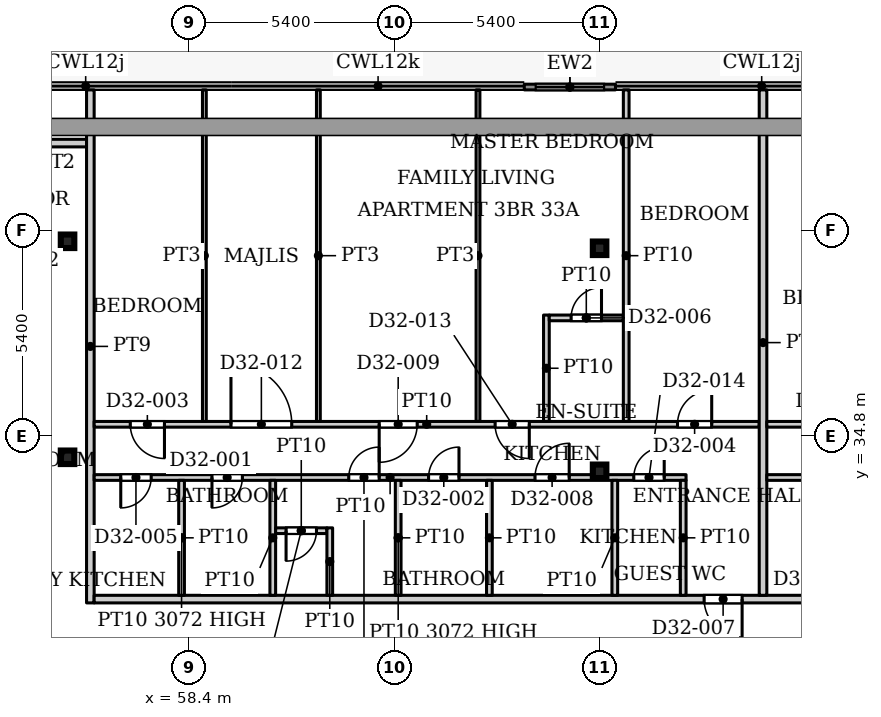
"""IFC4 building model, lengths in metres.
Left out: names, types, materials, properties, quantities, classifications, styles, units other than length and angle.
Written with IfcOpenShell. Run it as: python <this file> out.ifc"""

import sys

from ifc_helpers import new_model, si_unit, direction, frame, frame_2d, origin, origin_2d, place, context, subcontext, project, spatial, rectangle, hollow_rectangle, extrude, source, transform, mapped, element, fill, save


model = new_model("IFC4")
c1 = context("Model", 3, precision=1e-05, world=origin(), true_north=direction((0.0, 1.0)))
c2 = subcontext(c1, "Body", "Model", "MODEL_VIEW")
j1 = project(units=[si_unit("LENGTHUNIT", "METRE"), si_unit("PLANEANGLEUNIT", "RADIAN")], contexts=[c1])
p1 = place(None, origin())
s1 = spatial("IfcSite", under=j1, at=p1, CompositionType="ELEMENT")
p2 = place(p1, origin())
s2 = spatial("IfcBuilding", under=s1, at=p2, CompositionType="ELEMENT")
p3 = place(p2, frame((0.0, 0.0, 140.9)))
s3 = spatial("IfcBuildingStorey", under=s2, at=p3, CompositionType="ELEMENT", Elevation=140.9)
for number, where, z_axis, x_axis in (
    (1, (69.2, 33.863, 0.0), (0.0, 0.0, 1.0), (1.0, 0.0, 0.0)),
    (2, (55.2, 34.232, 0.0), (0.0, 0.0, 1.0), (1.0, 0.0, 0.0)),
    (3, (69.2, 39.732, 0.0), (0.0, 0.0, 1.0), (1.0, 0.0, 0.0)),
    (4, (55.2, 39.916, 0.0), (0.0, 0.0, 1.0), (1.0, 0.0, 0.0)),
):
    element("IfcColumn", number, at=place(p3, frame(where, z_axis=z_axis, x_axis=x_axis)), inside=s3, PredefinedType="COLUMN", context=c2, shape_type="SweptSolid", body=[
        extrude(hollow_rectangle(XDim=0.356, YDim=0.356, WallThickness=0.016, InnerFilletRadius=0.016, OuterFilletRadius=0.032, at=origin_2d()), origin(), (0.0, 0.0, 1.0), 3.9),
    ])
p4 = place(p3, frame((67.218, 43.975, 0.0), z_axis=(0.0, 0.0, 1.0), x_axis=(1.0, 0.0, 0.0)))
e5 = element("IfcWall", 5, at=p4, inside=s3, PredefinedType="SOLIDWALL", context=c2, shape_type="SweptSolid", body=[
    extrude(rectangle(XDim=2.4, YDim=0.15, at=frame_2d((1.2, 0.0))), origin(), (0.0, 0.0, 1.0), 3.75),
])
p5 = place(p4, frame((0.3, 0.0, 0.0)))
e6 = element("IfcOpeningElement", 6, at=p5, cuts=e5, PredefinedType="OPENING", context=c2, shape_type="SweptSolid", body=[
    extrude(rectangle(XDim=1.8, YDim=2.4, at=frame_2d((0.9, 1.2))), frame((0.0, 0.085, 0.0), z_axis=(0.0, -1.0, 0.0), x_axis=(1.0, 0.0, 0.0)), (0.0, 0.0, 1.0), 0.17),
])
p6 = place(p3, frame((53.5, 42.5, 0.0), z_axis=(0.0, 0.0, 1.0), x_axis=(1.0, 0.0, 0.0)))
e7 = element("IfcWall", 7, at=p6, inside=s3, PredefinedType="PARTITIONING", context=c2, shape_type="SweptSolid", body=[
    extrude(rectangle(XDim=2.2, YDim=0.2, at=frame_2d((1.1, 0.0))), origin(), (0.0, 0.0, 1.0), 3.6),
])
p7 = place(p3, frame((55.8, 30.4, 0.0), z_axis=(0.0, 0.0, 1.0), x_axis=(0.0, 1.0, 0.0)))
e8 = element("IfcWall", 8, at=p7, inside=s3, PredefinedType="PARTITIONING", context=c2, shape_type="SweptSolid", body=[
    extrude(rectangle(XDim=13.5, YDim=0.2, at=frame_2d((6.75, 0.0))), origin(), (0.0, 0.0, 1.0), 3.6),
])
p8 = place(p3, frame((55.9, 30.5, 0.0), z_axis=(0.0, 0.0, 1.0), x_axis=(1.0, 0.0, 0.0)))
e9 = element("IfcWall", 9, at=p8, inside=s3, PredefinedType="PARTITIONING", context=c2, shape_type="SweptSolid", body=[
    extrude(rectangle(XDim=42.2, YDim=0.2, at=frame_2d((21.1, 0.0))), origin(), (0.0, 0.0, 1.0), 3.6),
])
p9 = place(p8, frame((16.05, 0.0, 0.0)))
e10 = element("IfcOpeningElement", 10, at=p9, cuts=e9, PredefinedType="OPENING", context=c2, shape_type="SweptSolid", body=[
    extrude(rectangle(XDim=1.0, YDim=2.1, at=frame_2d((0.5, 1.05))), frame((0.0, 0.11, 0.0), z_axis=(0.0, -1.0, 0.0), x_axis=(1.0, 0.0, 0.0)), (0.0, 0.0, 1.0), 0.22),
])
p10 = place(p8, frame((22.8, 0.0, 0.0)))
e11 = element("IfcOpeningElement", 11, at=p10, cuts=e9, PredefinedType="OPENING", context=c2, shape_type="SweptSolid", body=[
    extrude(rectangle(XDim=1.0, YDim=2.1, at=frame_2d((0.5, 1.05))), frame((0.0, 0.11, 0.0), z_axis=(0.0, -1.0, 0.0), x_axis=(1.0, 0.0, 0.0)), (0.0, 0.0, 1.0), 0.22),
])
p11 = place(p8, frame((29.55, 0.0, 0.0)))
e12 = element("IfcOpeningElement", 12, at=p11, cuts=e9, PredefinedType="OPENING", context=c2, shape_type="SweptSolid", body=[
    extrude(rectangle(XDim=1.0, YDim=2.1, at=frame_2d((0.5, 1.05))), frame((0.0, 0.11, 0.0), z_axis=(0.0, -1.0, 0.0), x_axis=(1.0, 0.0, 0.0)), (0.0, 0.0, 1.0), 0.22),
])
p12 = place(p3, frame((55.9, 33.7, 0.0), z_axis=(0.0, 0.0, 1.0), x_axis=(1.0, 0.0, 0.0)))
e13 = element("IfcWall", 13, at=p12, inside=s3, PredefinedType="PARTITIONING", context=c2, shape_type="SweptSolid", body=[
    extrude(rectangle(XDim=15.575, YDim=0.15, at=frame_2d((7.788, 0.0))), origin(), (0.0, 0.0, 1.0), 3.6),
])
p13 = place(p12, frame((3.1, 0.0, 0.0)))
e14 = element("IfcOpeningElement", 14, at=p13, cuts=e13, PredefinedType="OPENING", context=c2, shape_type="SweptSolid", body=[
    extrude(rectangle(XDim=0.8, YDim=2.1, at=frame_2d((0.4, 1.05))), frame((0.0, 0.085, 0.0), z_axis=(0.0, -1.0, 0.0), x_axis=(1.0, 0.0, 0.0)), (0.0, 0.0, 1.0), 0.17),
])
p14 = place(p12, frame((8.8, 0.0, 0.0)))
e15 = element("IfcOpeningElement", 15, at=p14, cuts=e13, PredefinedType="OPENING", context=c2, shape_type="SweptSolid", body=[
    extrude(rectangle(XDim=0.8, YDim=2.1, at=frame_2d((0.4, 1.05))), frame((0.0, 0.085, 0.0), z_axis=(0.0, -1.0, 0.0), x_axis=(1.0, 0.0, 0.0)), (0.0, 0.0, 1.0), 0.17),
])
p15 = place(p12, frame((0.7, 0.0, 0.0)))
e16 = element("IfcOpeningElement", 16, at=p15, cuts=e13, PredefinedType="OPENING", context=c2, shape_type="SweptSolid", body=[
    extrude(rectangle(XDim=0.8, YDim=2.1, at=frame_2d((0.4, 1.05))), frame((0.0, 0.085, 0.0), z_axis=(0.0, -1.0, 0.0), x_axis=(1.0, 0.0, 0.0)), (0.0, 0.0, 1.0), 0.17),
])
p16 = place(p12, frame((11.6, 0.0, 0.0)))
e17 = element("IfcOpeningElement", 17, at=p16, cuts=e13, PredefinedType="OPENING", context=c2, shape_type="SweptSolid", body=[
    extrude(rectangle(XDim=0.9, YDim=2.1, at=frame_2d((0.45, 1.05))), frame((0.0, 0.085, 0.0), z_axis=(0.0, -1.0, 0.0), x_axis=(1.0, 0.0, 0.0)), (0.0, 0.0, 1.0), 0.17),
])
p17 = place(p12, frame((6.7, 0.0, 0.0)))
e18 = element("IfcOpeningElement", 18, at=p17, cuts=e13, PredefinedType="OPENING", context=c2, shape_type="SweptSolid", body=[
    extrude(rectangle(XDim=0.8, YDim=2.1, at=frame_2d((0.4, 1.05))), frame((0.0, 0.085, 0.0), z_axis=(0.0, -1.0, 0.0), x_axis=(1.0, 0.0, 0.0)), (0.0, 0.0, 1.0), 0.17),
])
p18 = place(p12, frame((14.2, 0.0, 0.0)))
e19 = element("IfcOpeningElement", 19, at=p18, cuts=e13, PredefinedType="OPENING", context=c2, shape_type="SweptSolid", body=[
    extrude(rectangle(XDim=0.8, YDim=2.1, at=frame_2d((0.4, 1.05))), frame((0.0, 0.085, 0.0), z_axis=(0.0, -1.0, 0.0), x_axis=(1.0, 0.0, 0.0)), (0.0, 0.0, 1.0), 0.17),
])
p19 = place(p3, frame((55.9, 35.1, 0.0), z_axis=(0.0, 0.0, 1.0), x_axis=(1.0, 0.0, 0.0)))
e20 = element("IfcWall", 20, at=p19, inside=s3, PredefinedType="PARTITIONING", context=c2, shape_type="SweptSolid", body=[
    extrude(rectangle(XDim=17.5, YDim=0.15, at=frame_2d((8.75, 0.0))), origin(), (0.0, 0.0, 1.0), 3.6),
])
p20 = place(p19, frame((0.95, 0.0, 0.0)))
e21 = element("IfcOpeningElement", 21, at=p20, cuts=e20, PredefinedType="OPENING", context=c2, shape_type="SweptSolid", body=[
    extrude(rectangle(XDim=0.9, YDim=2.1, at=frame_2d((0.45, 1.05))), frame((0.0, 0.085, 0.0), z_axis=(0.0, -1.0, 0.0), x_axis=(1.0, 0.0, 0.0)), (0.0, 0.0, 1.0), 0.17),
])
p21 = place(p19, frame((15.35, 0.0, 0.0)))
e22 = element("IfcOpeningElement", 22, at=p21, cuts=e20, PredefinedType="OPENING", context=c2, shape_type="SweptSolid", body=[
    extrude(rectangle(XDim=0.9, YDim=2.1, at=frame_2d((0.45, 1.05))), frame((0.0, 0.085, 0.0), z_axis=(0.0, -1.0, 0.0), x_axis=(1.0, 0.0, 0.0)), (0.0, 0.0, 1.0), 0.17),
])
p22 = place(p19, frame((7.5, 0.0, 0.0)))
e23 = element("IfcOpeningElement", 23, at=p22, cuts=e20, PredefinedType="OPENING", context=c2, shape_type="SweptSolid", body=[
    extrude(rectangle(XDim=1.0, YDim=2.1, at=frame_2d((0.5, 1.05))), frame((0.0, 0.085, 0.0), z_axis=(0.0, -1.0, 0.0), x_axis=(1.0, 0.0, 0.0)), (0.0, 0.0, 1.0), 0.17),
])
p23 = place(p19, frame((3.6, 0.0, 0.0)))
e24 = element("IfcOpeningElement", 24, at=p23, cuts=e20, PredefinedType="OPENING", context=c2, shape_type="SweptSolid", body=[
    extrude(rectangle(XDim=1.6, YDim=2.1, at=frame_2d((0.8, 1.05))), frame((0.0, 0.085, 0.0), z_axis=(0.0, -1.0, 0.0), x_axis=(1.0, 0.0, 0.0)), (0.0, 0.0, 1.0), 0.17),
])
p24 = place(p19, frame((10.55, 0.0, 0.0)))
e25 = element("IfcOpeningElement", 25, at=p24, cuts=e20, PredefinedType="OPENING", context=c2, shape_type="SweptSolid", body=[
    extrude(rectangle(XDim=0.9, YDim=2.1, at=frame_2d((0.45, 1.05))), frame((0.0, 0.085, 0.0), z_axis=(0.0, -1.0, 0.0), x_axis=(1.0, 0.0, 0.0)), (0.0, 0.0, 1.0), 0.17),
])
p25 = place(p3, frame((58.2, 30.6, 0.0), z_axis=(0.0, 0.0, 1.0), x_axis=(0.0, 1.0, 0.0)))
e26 = element("IfcWall", 26, at=p25, inside=s3, PredefinedType="PARTITIONING", context=c2, shape_type="SweptSolid", body=[
    extrude(rectangle(XDim=3.025, YDim=0.15, at=frame_2d((1.512, 0.0))), origin(), (0.0, 0.0, 1.0), 3.072),
])
p26 = place(p3, frame((58.8, 35.175, 0.0), z_axis=(0.0, 0.0, 1.0), x_axis=(0.0, 1.0, 0.0)))
e27 = element("IfcWall", 27, at=p26, inside=s3, PredefinedType="PARTITIONING", context=c2, shape_type="SweptSolid", body=[
    extrude(rectangle(XDim=8.725, YDim=0.1, at=frame_2d((4.362, 0.0))), origin(), (0.0, 0.0, 1.0), 3.6),
])
p27 = place(p3, frame((60.6, 30.6, 0.0), z_axis=(0.0, 0.0, 1.0), x_axis=(0.0, 1.0, 0.0)))
e28 = element("IfcWall", 28, at=p27, inside=s3, PredefinedType="PARTITIONING", context=c2, shape_type="SweptSolid", body=[
    extrude(rectangle(XDim=3.025, YDim=0.15, at=frame_2d((1.512, 0.0))), origin(), (0.0, 0.0, 1.0), 3.6),
])
p28 = place(p3, frame((60.675, 32.3, 0.0), z_axis=(0.0, 0.0, 1.0), x_axis=(1.0, 0.0, 0.0)))
e29 = element("IfcWall", 29, at=p28, inside=s3, PredefinedType="PARTITIONING", context=c2, shape_type="SweptSolid", body=[
    extrude(rectangle(XDim=1.35, YDim=0.15, at=frame_2d((0.675, 0.0))), origin(), (0.0, 0.0, 1.0), 3.6),
])
p29 = place(p28, frame((0.275, 0.0, 0.0)))
e30 = element("IfcOpeningElement", 30, at=p29, cuts=e29, PredefinedType="OPENING", context=c2, shape_type="SweptSolid", body=[
    extrude(rectangle(XDim=0.8, YDim=2.1, at=frame_2d((0.4, 1.05))), frame((0.0, 0.085, 0.0), z_axis=(0.0, -1.0, 0.0), x_axis=(1.0, 0.0, 0.0)), (0.0, 0.0, 1.0), 0.17),
])
p30 = place(p3, frame((61.8, 35.175, 0.0), z_axis=(0.0, 0.0, 1.0), x_axis=(0.0, 1.0, 0.0)))
e31 = element("IfcWall", 31, at=p30, inside=s3, PredefinedType="PARTITIONING", context=c2, shape_type="SweptSolid", body=[
    extrude(rectangle(XDim=8.725, YDim=0.1, at=frame_2d((4.362, 0.0))), origin(), (0.0, 0.0, 1.0), 3.6),
])
p31 = place(p3, frame((62.1, 30.6, 0.0), z_axis=(0.0, 0.0, 1.0), x_axis=(0.0, 1.0, 0.0)))
e32 = element("IfcWall", 32, at=p31, inside=s3, PredefinedType="PARTITIONING", context=c2, shape_type="SweptSolid", body=[
    extrude(rectangle(XDim=1.775, YDim=0.15, at=frame_2d((0.887, 0.0))), origin(), (0.0, 0.0, 1.0), 3.6),
])
p32 = place(p3, frame((63.9, 30.6, 0.0), z_axis=(0.0, 0.0, 1.0), x_axis=(0.0, 1.0, 0.0)))
e33 = element("IfcWall", 33, at=p32, inside=s3, PredefinedType="PARTITIONING", context=c2, shape_type="SweptSolid", body=[
    extrude(rectangle(XDim=3.025, YDim=0.15, at=frame_2d((1.512, 0.0))), origin(), (0.0, 0.0, 1.0), 3.072),
])
p33 = place(p3, frame((66.0, 35.175, 0.0), z_axis=(0.0, 0.0, 1.0), x_axis=(0.0, 1.0, 0.0)))
e34 = element("IfcWall", 34, at=p33, inside=s3, PredefinedType="PARTITIONING", context=c2, shape_type="SweptSolid", body=[
    extrude(rectangle(XDim=8.725, YDim=0.1, at=frame_2d((4.362, 0.0))), origin(), (0.0, 0.0, 1.0), 3.6),
])
p34 = place(p3, frame((66.3, 30.6, 0.0), z_axis=(0.0, 0.0, 1.0), x_axis=(0.0, 1.0, 0.0)))
e35 = element("IfcWall", 35, at=p34, inside=s3, PredefinedType="PARTITIONING", context=c2, shape_type="SweptSolid", body=[
    extrude(rectangle(XDim=3.025, YDim=0.15, at=frame_2d((1.512, 0.0))), origin(), (0.0, 0.0, 1.0), 3.6),
])
p35 = place(p3, frame((67.8, 35.175, 0.0), z_axis=(0.0, 0.0, 1.0), x_axis=(0.0, 1.0, 0.0)))
e36 = element("IfcWall", 36, at=p35, inside=s3, PredefinedType="PARTITIONING", context=c2, shape_type="SweptSolid", body=[
    extrude(rectangle(XDim=2.8, YDim=0.15, at=frame_2d((1.4, 0.0))), origin(), (0.0, 0.0, 1.0), 3.6),
])
p36 = place(p3, frame((67.875, 37.9, 0.0), z_axis=(0.0, 0.0, 1.0), x_axis=(1.0, 0.0, 0.0)))
e37 = element("IfcWall", 37, at=p36, inside=s3, PredefinedType="PARTITIONING", context=c2, shape_type="SweptSolid", body=[
    extrude(rectangle(XDim=1.95, YDim=0.15, at=frame_2d((0.975, 0.0))), origin(), (0.0, 0.0, 1.0), 3.6),
])
p37 = place(p36, frame((0.575, 0.0, 0.0)))
e38 = element("IfcOpeningElement", 38, at=p37, cuts=e37, PredefinedType="OPENING", context=c2, shape_type="SweptSolid", body=[
    extrude(rectangle(XDim=0.8, YDim=2.1, at=frame_2d((0.4, 1.05))), frame((0.0, 0.085, 0.0), z_axis=(0.0, -1.0, 0.0), x_axis=(1.0, 0.0, 0.0)), (0.0, 0.0, 1.0), 0.17),
])
p38 = place(p3, frame((69.6, 30.6, 0.0), z_axis=(0.0, 0.0, 1.0), x_axis=(0.0, 1.0, 0.0)))
e39 = element("IfcWall", 39, at=p38, inside=s3, PredefinedType="PARTITIONING", context=c2, shape_type="SweptSolid", body=[
    extrude(rectangle(XDim=3.025, YDim=0.15, at=frame_2d((1.512, 0.0))), origin(), (0.0, 0.0, 1.0), 3.6),
])
p39 = place(p3, frame((69.9, 35.175, 0.0), z_axis=(0.0, 0.0, 1.0), x_axis=(0.0, 1.0, 0.0)))
e40 = element("IfcWall", 40, at=p39, inside=s3, PredefinedType="PARTITIONING", context=c2, shape_type="SweptSolid", body=[
    extrude(rectangle(XDim=8.725, YDim=0.15, at=frame_2d((4.362, 0.0))), origin(), (0.0, 0.0, 1.0), 3.6),
])
p40 = place(p3, frame((71.4, 30.6, 0.0), z_axis=(0.0, 0.0, 1.0), x_axis=(0.0, 1.0, 0.0)))
e41 = element("IfcWall", 41, at=p40, inside=s3, PredefinedType="PARTITIONING", context=c2, shape_type="SweptSolid", body=[
    extrude(rectangle(XDim=3.025, YDim=0.15, at=frame_2d((1.512, 0.0))), origin(), (0.0, 0.0, 1.0), 3.6),
])
p41 = place(p3, frame((73.5, 30.6, 0.0), z_axis=(0.0, 0.0, 1.0), x_axis=(0.0, 1.0, 0.0)))
e42 = element("IfcWall", 42, at=p41, inside=s3, PredefinedType="PARTITIONING", context=c2, shape_type="SweptSolid", body=[
    extrude(rectangle(XDim=13.3, YDim=0.2, at=frame_2d((6.65, 0.0))), origin(), (0.0, 0.0, 1.0), 3.6),
])
p42 = place(p3, frame((73.6, 33.7, 0.0), z_axis=(0.0, 0.0, 1.0), x_axis=(1.0, 0.0, 0.0)))
e43 = element("IfcWall", 43, at=p42, inside=s3, PredefinedType="PARTITIONING", context=c2, shape_type="SweptSolid", body=[
    extrude(rectangle(XDim=4.775, YDim=0.15, at=frame_2d((2.387, 0.0))), origin(), (0.0, 0.0, 1.0), 3.6),
])
p43 = place(p42, frame((1.1, 0.0, 0.0)))
e44 = element("IfcOpeningElement", 44, at=p43, cuts=e43, PredefinedType="OPENING", context=c2, shape_type="SweptSolid", body=[
    extrude(rectangle(XDim=0.9, YDim=2.1, at=frame_2d((0.45, 1.05))), frame((0.0, 0.085, 0.0), z_axis=(0.0, -1.0, 0.0), x_axis=(1.0, 0.0, 0.0)), (0.0, 0.0, 1.0), 0.17),
])
p44 = place(p42, frame((3.55, 0.0, 0.0)))
e45 = element("IfcOpeningElement", 45, at=p44, cuts=e43, PredefinedType="OPENING", context=c2, shape_type="SweptSolid", body=[
    extrude(rectangle(XDim=0.8, YDim=2.1, at=frame_2d((0.4, 1.05))), frame((0.0, 0.085, 0.0), z_axis=(0.0, -1.0, 0.0), x_axis=(1.0, 0.0, 0.0)), (0.0, 0.0, 1.0), 0.17),
])
p45 = place(p3, frame((73.6, 35.1, 0.0), z_axis=(0.0, 0.0, 1.0), x_axis=(1.0, 0.0, 0.0)))
e46 = element("IfcWall", 46, at=p45, inside=s3, PredefinedType="PARTITIONING", context=c2, shape_type="SweptSolid", body=[
    extrude(rectangle(XDim=8.8, YDim=0.15, at=frame_2d((4.4, 0.0))), origin(), (0.0, 0.0, 1.0), 3.6),
])
p46 = place(p45, frame((1.4, 0.0, 0.0)))
e47 = element("IfcOpeningElement", 47, at=p46, cuts=e46, PredefinedType="OPENING", context=c2, shape_type="SweptSolid", body=[
    extrude(rectangle(XDim=0.9, YDim=2.1, at=frame_2d((0.45, 1.05))), frame((0.0, 0.085, 0.0), z_axis=(0.0, -1.0, 0.0), x_axis=(1.0, 0.0, 0.0)), (0.0, 0.0, 1.0), 0.17),
])
p47 = place(p45, frame((5.85, 0.0, 0.0)))
e48 = element("IfcOpeningElement", 48, at=p47, cuts=e46, PredefinedType="OPENING", context=c2, shape_type="SweptSolid", body=[
    extrude(rectangle(XDim=1.0, YDim=2.1, at=frame_2d((0.5, 1.05))), frame((0.0, 0.085, 0.0), z_axis=(0.0, -1.0, 0.0), x_axis=(1.0, 0.0, 0.0)), (0.0, 0.0, 1.0), 0.17),
])
m1 = source(origin(), c2, "Body", "SweptSolid", [
    extrude(rectangle(XDim=1.8, YDim=2.4, at=frame_2d((0.9, 1.2))), frame((0.0, 0.025, 0.0), z_axis=(0.0, -1.0, 0.0), x_axis=(1.0, 0.0, 0.0)), (0.0, 0.0, 1.0), 0.05),
])
p48 = place(p5, origin())
e49 = element("IfcDoor", 49, at=p48, inside=s3, OperationType="SLIDING_TO_LEFT", PredefinedType="DOOR", context=c2, shape_type="MappedRepresentation", body=[
    mapped(m1, transform((0.0, 0.0, 0.0), x_axis=(1.0, 0.0, 0.0), y_axis=(0.0, 1.0, 0.0), z_axis=(0.0, 0.0, 1.0), scale=1.0)),
])
fill(e6, e49)
m2 = source(origin(), c2, "Body", "SweptSolid", [
    extrude(rectangle(XDim=0.8, YDim=2.1, at=frame_2d((0.4, 1.05))), frame((0.0, 0.025, 0.0), z_axis=(0.0, -1.0, 0.0), x_axis=(1.0, 0.0, 0.0)), (0.0, 0.0, 1.0), 0.05),
])
p49 = place(p13, origin())
e50 = element("IfcDoor", 50, at=p49, inside=s3, OperationType="SINGLE_SWING_RIGHT", PredefinedType="DOOR", context=c2, shape_type="MappedRepresentation", body=[
    mapped(m2, transform((0.0, 0.0, 0.0), x_axis=(1.0, 0.0, 0.0), y_axis=(0.0, 1.0, 0.0), z_axis=(0.0, 0.0, 1.0), scale=1.0)),
])
fill(e14, e50)
p50 = place(p14, origin())
e51 = element("IfcDoor", 51, at=p50, inside=s3, OperationType="SINGLE_SWING_LEFT", PredefinedType="DOOR", context=c2, shape_type="MappedRepresentation", body=[
    mapped(m2, transform((0.0, 0.0, 0.0), x_axis=(1.0, 0.0, 0.0), y_axis=(0.0, 1.0, 0.0), z_axis=(0.0, 0.0, 1.0), scale=1.0)),
])
fill(e15, e51)
m3 = source(origin(), c2, "Body", "SweptSolid", [
    extrude(rectangle(XDim=0.9, YDim=2.1, at=frame_2d((0.45, 1.05))), frame((0.0, 0.025, 0.0), z_axis=(0.0, -1.0, 0.0), x_axis=(1.0, 0.0, 0.0)), (0.0, 0.0, 1.0), 0.05),
])
p51 = place(p20, origin())
e52 = element("IfcDoor", 52, at=p51, inside=s3, OperationType="SINGLE_SWING_RIGHT", PredefinedType="DOOR", context=c2, shape_type="MappedRepresentation", body=[
    mapped(m3, transform((0.0, 0.0, 0.0), x_axis=(1.0, 0.0, 0.0), y_axis=(0.0, 1.0, 0.0), z_axis=(0.0, 0.0, 1.0), scale=1.0)),
])
fill(e21, e52)
p52 = place(p21, origin())
e53 = element("IfcDoor", 53, at=p52, inside=s3, OperationType="SINGLE_SWING_LEFT", PredefinedType="DOOR", context=c2, shape_type="MappedRepresentation", body=[
    mapped(m3, transform((0.0, 0.0, 0.0), x_axis=(1.0, 0.0, 0.0), y_axis=(0.0, 1.0, 0.0), z_axis=(0.0, 0.0, 1.0), scale=1.0)),
])
fill(e22, e53)
p53 = place(p15, origin())
e54 = element("IfcDoor", 54, at=p53, inside=s3, OperationType="SINGLE_SWING_RIGHT", PredefinedType="DOOR", context=c2, shape_type="MappedRepresentation", body=[
    mapped(m2, transform((0.0, 0.0, 0.0), x_axis=(1.0, 0.0, 0.0), y_axis=(0.0, 1.0, 0.0), z_axis=(0.0, 0.0, 1.0), scale=1.0)),
])
fill(e16, e54)
p54 = place(p37, origin())
e55 = element("IfcDoor", 55, at=p54, inside=s3, OperationType="SINGLE_SWING_LEFT", PredefinedType="DOOR", context=c2, shape_type="MappedRepresentation", body=[
    mapped(m2, transform((0.0, 0.0, 0.0), x_axis=(1.0, 0.0, 0.0), y_axis=(0.0, 1.0, 0.0), z_axis=(0.0, 0.0, 1.0), scale=1.0)),
])
fill(e38, e55)
m4 = source(origin(), c2, "Body", "SweptSolid", [
    extrude(rectangle(XDim=1.0, YDim=2.1, at=frame_2d((0.5, 1.05))), frame((0.0, 0.025, 0.0), z_axis=(0.0, -1.0, 0.0), x_axis=(1.0, 0.0, 0.0)), (0.0, 0.0, 1.0), 0.05),
])
p55 = place(p9, origin())
e56 = element("IfcDoor", 56, at=p55, inside=s3, OperationType="SINGLE_SWING_RIGHT", PredefinedType="DOOR", context=c2, shape_type="MappedRepresentation", body=[
    mapped(m4, transform((0.0, 0.0, 0.0), x_axis=(1.0, 0.0, 0.0), y_axis=(0.0, 1.0, 0.0), z_axis=(0.0, 0.0, 1.0), scale=1.0)),
])
fill(e10, e56)
p56 = place(p16, origin())
e57 = element("IfcDoor", 57, at=p56, inside=s3, OperationType="SINGLE_SWING_LEFT", PredefinedType="DOOR", context=c2, shape_type="MappedRepresentation", body=[
    mapped(m3, transform((0.0, 0.0, 0.0), x_axis=(1.0, 0.0, 0.0), y_axis=(0.0, 1.0, 0.0), z_axis=(0.0, 0.0, 1.0), scale=1.0)),
])
fill(e17, e57)
m5 = source(origin(), c2, "Body", "SweptSolid", [
    extrude(rectangle(XDim=1.0, YDim=2.1, at=frame_2d((0.5, 1.05))), frame((0.0, 0.025, 0.0), z_axis=(0.0, -1.0, 0.0), x_axis=(1.0, 0.0, 0.0)), (0.0, 0.0, 1.0), 0.05),
])
p57 = place(p22, origin())
e58 = element("IfcDoor", 58, at=p57, inside=s3, OperationType="SINGLE_SWING_RIGHT", PredefinedType="DOOR", context=c2, shape_type="MappedRepresentation", body=[
    mapped(m5, transform((0.0, 0.0, 0.0), x_axis=(1.0, 0.0, 0.0), y_axis=(0.0, 1.0, 0.0), z_axis=(0.0, 0.0, 1.0), scale=1.0)),
])
fill(e23, e58)
p58 = place(p17, origin())
e59 = element("IfcDoor", 59, at=p58, inside=s3, OperationType="SINGLE_SWING_LEFT", PredefinedType="DOOR", context=c2, shape_type="MappedRepresentation", body=[
    mapped(m2, transform((0.0, 0.0, 0.0), x_axis=(1.0, 0.0, 0.0), y_axis=(0.0, 1.0, 0.0), z_axis=(0.0, 0.0, 1.0), scale=1.0)),
])
fill(e18, e59)
p59 = place(p29, origin())
e60 = element("IfcDoor", 60, at=p59, inside=s3, OperationType="SINGLE_SWING_RIGHT", PredefinedType="DOOR", context=c2, shape_type="MappedRepresentation", body=[
    mapped(m2, transform((0.0, 0.0, 0.0), x_axis=(1.0, 0.0, 0.0), y_axis=(0.0, 1.0, 0.0), z_axis=(0.0, 0.0, 1.0), scale=1.0)),
])
fill(e30, e60)
m6 = source(origin(), c2, "Body", "SweptSolid", [
    extrude(rectangle(XDim=1.6, YDim=2.1, at=frame_2d((0.8, 1.05))), frame((0.0, 0.025, 0.0), z_axis=(0.0, -1.0, 0.0), x_axis=(1.0, 0.0, 0.0)), (0.0, 0.0, 1.0), 0.05),
])
p60 = place(p23, origin())
e61 = element("IfcDoor", 61, at=p60, inside=s3, OperationType="DOUBLE_DOOR_SINGLE_SWING", PredefinedType="DOOR", context=c2, shape_type="MappedRepresentation", body=[
    mapped(m6, transform((0.0, 0.0, 0.0), x_axis=(1.0, 0.0, 0.0), y_axis=(0.0, 1.0, 0.0), z_axis=(0.0, 0.0, 1.0), scale=1.0)),
])
fill(e24, e61)
p61 = place(p24, origin())
e62 = element("IfcDoor", 62, at=p61, inside=s3, OperationType="SINGLE_SWING_RIGHT", PredefinedType="DOOR", context=c2, shape_type="MappedRepresentation", body=[
    mapped(m3, transform((0.0, 0.0, 0.0), x_axis=(1.0, 0.0, 0.0), y_axis=(0.0, 1.0, 0.0), z_axis=(0.0, 0.0, 1.0), scale=1.0)),
])
fill(e25, e62)
p62 = place(p18, origin())
e63 = element("IfcDoor", 63, at=p62, inside=s3, OperationType="SINGLE_SWING_LEFT", PredefinedType="DOOR", context=c2, shape_type="MappedRepresentation", body=[
    mapped(m2, transform((0.0, 0.0, 0.0), x_axis=(1.0, 0.0, 0.0), y_axis=(0.0, 1.0, 0.0), z_axis=(0.0, 0.0, 1.0), scale=1.0)),
])
fill(e19, e63)
save(model, sys.argv[1])
